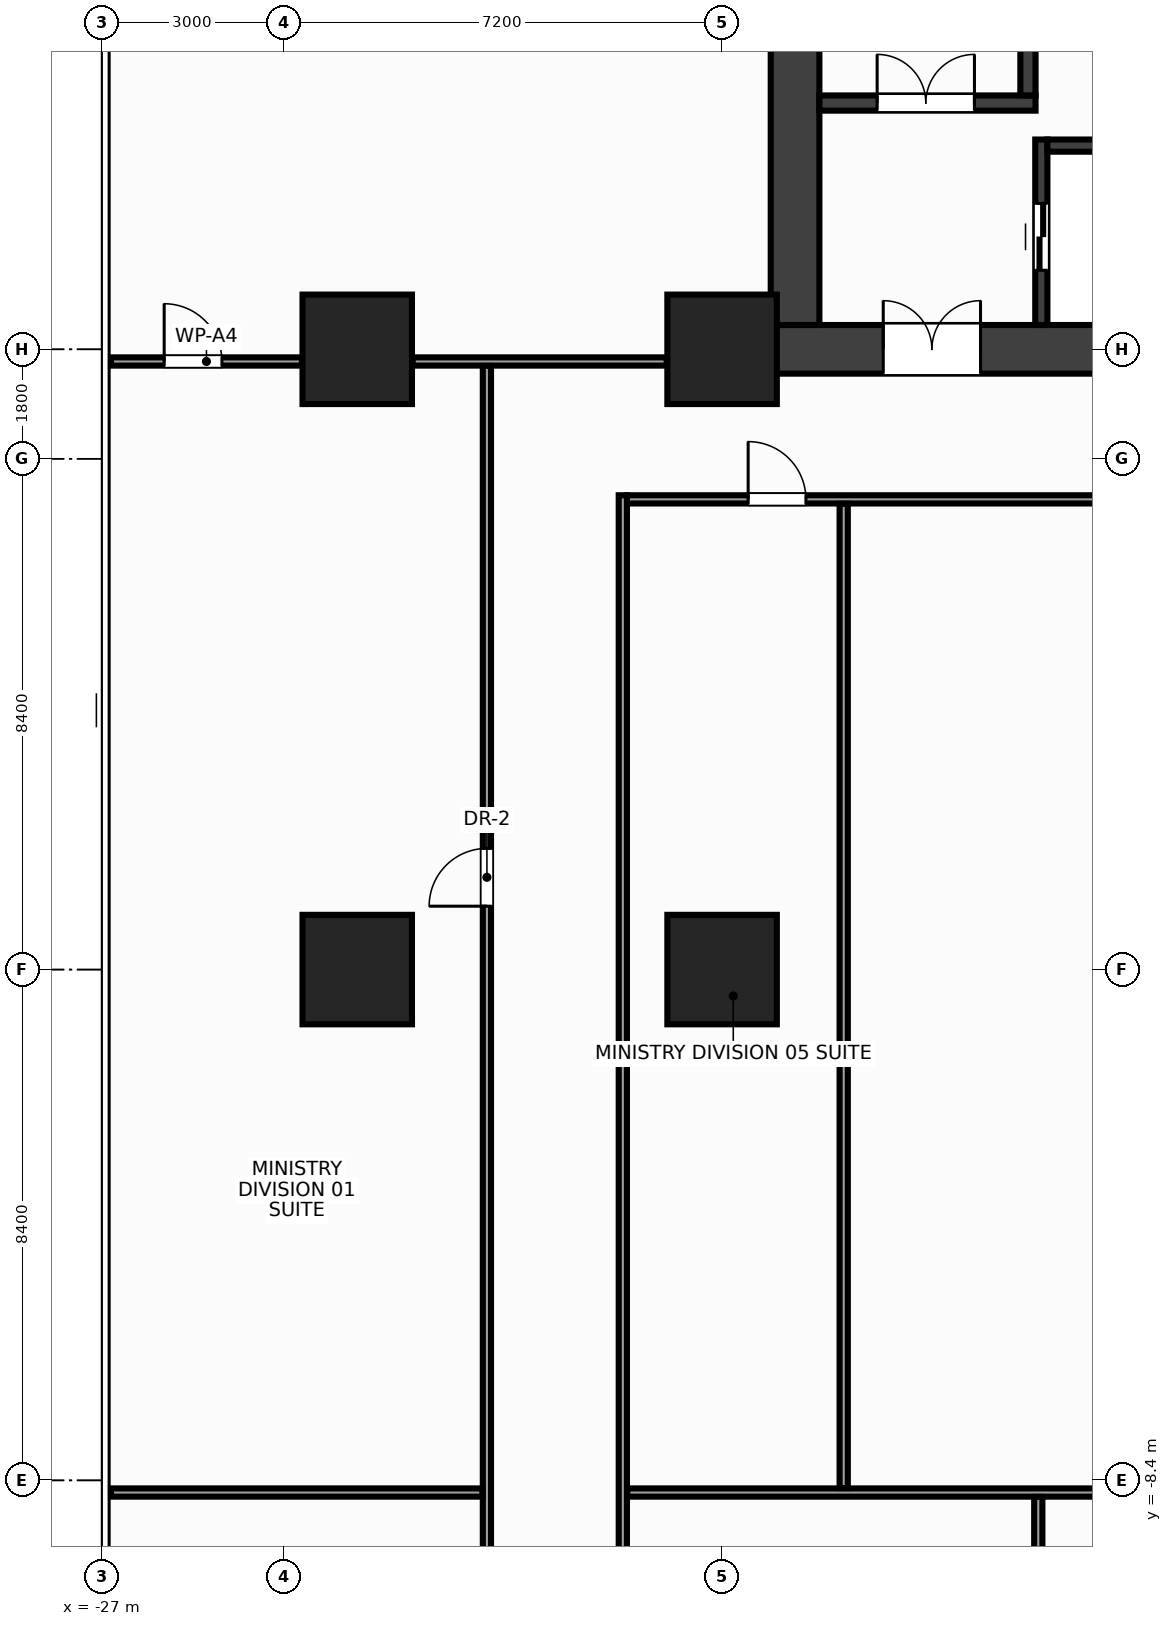
"""IFC4 building model, lengths in metres.
Left out: names, types, materials, properties, quantities, classifications, styles, units other than length and angle.
Written with IfcOpenShell. Run it as: python <this file> out.ifc"""

import sys

from ifc_helpers import new_model, si_unit, direction, frame, frame_2d, origin, origin_2d, place, context, subcontext, project, spatial, rectangle, extrude, source, transform, mapped, element, fill, save


model = new_model("IFC4")
c1 = context("Model", 3, precision=1e-05, world=origin(), true_north=direction((0.0, 1.0)))
c2 = subcontext(c1, "Body", "Model", "MODEL_VIEW")
j1 = project(units=[si_unit("LENGTHUNIT", "METRE"), si_unit("PLANEANGLEUNIT", "RADIAN")], contexts=[c1])
p1 = place(None, origin())
s1 = spatial("IfcSite", under=j1, at=p1, CompositionType="ELEMENT")
p2 = place(p1, origin())
s2 = spatial("IfcBuilding", under=s1, at=p2, CompositionType="ELEMENT")
p3 = place(p2, frame((0.0, 0.0, 34.4)))
s3 = spatial("IfcBuildingStorey", under=s2, at=p3, CompositionType="ELEMENT", Elevation=34.4)
m1 = source(origin(), c2, "Body", "SweptSolid", [
    extrude(rectangle(XDim=32.0, YDim=0.8, at=frame_2d((16.0, 0.0))), origin(), (0.0, 0.0, 1.0), 3.6),
])
p4 = place(p3, frame((-16.0, 10.2, 0.0), z_axis=(0.0, 0.0, 1.0), x_axis=(1.0, 0.0, 0.0)))
e1 = element("IfcWall", 1, at=p4, inside=s3, PredefinedType="SHEAR", context=c2, shape_type="MappedRepresentation", body=[
    mapped(m1, transform((0.0, 0.0, 0.0), x_axis=(1.0, 0.0, 0.0), y_axis=(0.0, 1.0, 0.0), z_axis=(0.0, 0.0, 1.0), scale=1.0)),
])
p5 = place(p4, frame((1.85, 0.0, 0.0)))
e2 = element("IfcOpeningElement", 2, at=p5, cuts=e1, PredefinedType="OPENING", context=c2, shape_type="SweptSolid", body=[
    extrude(rectangle(XDim=1.6, YDim=2.15, at=frame_2d((0.8, 1.075))), frame((0.0, 0.412, 0.0), z_axis=(0.0, -1.0, 0.0), x_axis=(1.0, 0.0, 0.0)), (0.0, 0.0, 1.0), 0.824),
])
p6 = place(p4, frame((28.55, 0.0, 0.0)))
e3 = element("IfcOpeningElement", 3, at=p6, cuts=e1, PredefinedType="OPENING", context=c2, shape_type="SweptSolid", body=[
    extrude(rectangle(XDim=1.6, YDim=2.15, at=frame_2d((0.8, 1.075))), frame((0.0, 0.412, 0.0), z_axis=(0.0, -1.0, 0.0), x_axis=(1.0, 0.0, 0.0)), (0.0, 0.0, 1.0), 0.824),
])
p7 = place(p4, frame((15.25, 0.0, 0.0)))
e4 = element("IfcOpeningElement", 4, at=p7, cuts=e1, PredefinedType="OPENING", context=c2, shape_type="SweptSolid", body=[
    extrude(rectangle(XDim=1.5, YDim=2.2, at=frame_2d((0.75, 1.1))), frame((0.0, 0.412, 0.0), z_axis=(0.0, -1.0, 0.0), x_axis=(1.0, 0.0, 0.0)), (0.0, 0.0, 1.0), 0.824),
])
m2 = source(origin(), c2, "Body", "SweptSolid", [
    extrude(rectangle(XDim=12.8, YDim=0.8, at=frame_2d((6.4, 0.0))), origin(), (0.0, 0.0, 1.0), 3.6),
])
p8 = place(p3, frame((-15.6, 10.6, 0.0), z_axis=(0.0, 0.0, 1.0), x_axis=(0.0, 1.0, 0.0)))
e5 = element("IfcWall", 5, at=p8, inside=s3, PredefinedType="SHEAR", context=c2, shape_type="MappedRepresentation", body=[
    mapped(m2, transform((0.0, 0.0, 0.0), x_axis=(1.0, 0.0, 0.0), y_axis=(0.0, 1.0, 0.0), z_axis=(0.0, 0.0, 1.0), scale=1.0)),
])
m3 = source(origin(), c2, "Body", "SweptSolid", [
    extrude(rectangle(XDim=3.555, YDim=0.25, at=frame_2d((1.777, 0.0))), origin(), (0.0, 0.0, 1.0), 3.6),
])
p9 = place(p3, frame((-15.2, 14.25, 0.0), z_axis=(0.0, 0.0, 1.0), x_axis=(1.0, 0.0, 0.0)))
e6 = element("IfcWall", 6, at=p9, inside=s3, PredefinedType="SHEAR", context=c2, shape_type="MappedRepresentation", body=[
    mapped(m3, transform((0.0, 0.0, 0.0), x_axis=(1.0, 0.0, 0.0), y_axis=(0.0, 1.0, 0.0), z_axis=(0.0, 0.0, 1.0), scale=1.0)),
])
p10 = place(p9, frame((0.95, 0.0, 0.0)))
e7 = element("IfcOpeningElement", 7, at=p10, cuts=e6, PredefinedType="OPENING", context=c2, shape_type="SweptSolid", body=[
    extrude(rectangle(XDim=1.6, YDim=2.15, at=frame_2d((0.8, 1.075))), frame((0.0, 0.137, 0.0), z_axis=(0.0, -1.0, 0.0), x_axis=(1.0, 0.0, 0.0)), (0.0, 0.0, 1.0), 0.274),
])
m4 = source(origin(), c2, "Body", "SweptSolid", [
    extrude(rectangle(XDim=9.025, YDim=0.25, at=frame_2d((4.512, 0.0))), origin(), (0.0, 0.0, 1.0), 3.6),
])
p11 = place(p3, frame((-11.77, 14.375, 0.0), z_axis=(0.0, 0.0, 1.0), x_axis=(0.0, 1.0, 0.0)))
e8 = element("IfcWall", 8, at=p11, inside=s3, PredefinedType="SHEAR", context=c2, shape_type="MappedRepresentation", body=[
    mapped(m4, transform((0.0, 0.0, 0.0), x_axis=(1.0, 0.0, 0.0), y_axis=(0.0, 1.0, 0.0), z_axis=(0.0, 0.0, 1.0), scale=1.0)),
])
m5 = source(origin(), c2, "Body", "SweptSolid", [
    extrude(rectangle(XDim=3.05, YDim=0.2, at=frame_2d((1.525, 0.0))), origin(), (0.0, 0.0, 1.0), 3.6),
])
p12 = place(p3, frame((-11.55, 10.6, 0.0), z_axis=(0.0, 0.0, 1.0), x_axis=(0.0, 1.0, 0.0)))
e9 = element("IfcWall", 9, at=p12, inside=s3, PredefinedType="SHEAR", context=c2, shape_type="MappedRepresentation", body=[
    mapped(m5, transform((0.0, 0.0, 0.0), x_axis=(1.0, 0.0, 0.0), y_axis=(0.0, 1.0, 0.0), z_axis=(0.0, 0.0, 1.0), scale=1.0)),
])
p13 = place(p12, frame((0.9, 0.0, 0.0)))
e10 = element("IfcOpeningElement", 10, at=p13, cuts=e9, PredefinedType="OPENING", context=c2, shape_type="SweptSolid", body=[
    extrude(rectangle(XDim=1.1, YDim=2.15, at=frame_2d((0.55, 1.075))), frame((0.0, 0.112, 0.0), z_axis=(0.0, -1.0, 0.0), x_axis=(1.0, 0.0, 0.0)), (0.0, 0.0, 1.0), 0.224),
])
m6 = source(origin(), c2, "Body", "SweptSolid", [
    extrude(rectangle(XDim=2.825, YDim=0.2, at=frame_2d((1.413, 0.0))), origin(), (0.0, 0.0, 1.0), 3.6),
])
p14 = place(p3, frame((-11.45, 13.55, 0.0), z_axis=(0.0, 0.0, 1.0), x_axis=(1.0, 0.0, 0.0)))
e11 = element("IfcWall", 11, at=p14, inside=s3, PredefinedType="SHEAR", context=c2, shape_type="MappedRepresentation", body=[
    mapped(m6, transform((0.0, 0.0, 0.0), x_axis=(1.0, 0.0, 0.0), y_axis=(0.0, 1.0, 0.0), z_axis=(0.0, 0.0, 1.0), scale=1.0)),
])
m7 = source(origin(), c2, "Body", "SweptSolid", [
    extrude(rectangle(XDim=1.8, YDim=1.8, at=origin_2d()), origin(), (0.0, 0.0, 1.0), 3.6),
])
for number, where, z_axis, x_axis in (
    (12, (-16.8, 0.0, 0.0), (0.0, 0.0, 1.0), (1.0, 0.0, 0.0)),
    (13, (-16.8, 10.2, 0.0), (0.0, 0.0, 1.0), (1.0, 0.0, 0.0)),
    (14, (-22.8, 0.0, 0.0), (0.0, 0.0, 1.0), (1.0, 0.0, 0.0)),
    (15, (-22.8, 10.2, 0.0), (0.0, 0.0, 1.0), (1.0, 0.0, 0.0)),
):
    element("IfcColumn", number, at=place(p3, frame(where, z_axis=z_axis, x_axis=x_axis)), inside=s3, PredefinedType="COLUMN", context=c2, shape_type="MappedRepresentation", body=[
        mapped(m7, transform((0.0, 0.0, 0.0), x_axis=(1.0, 0.0, 0.0), y_axis=(0.0, 1.0, 0.0), z_axis=(0.0, 0.0, 1.0), scale=1.0)),
    ])
m8 = source(origin(), c2, "Body", "SweptSolid", [
    extrude(rectangle(XDim=3.14, YDim=0.135, at=frame_2d((1.57, 0.0))), origin(), (0.0, 0.0, 1.0), 2.435),
])
p15 = place(p3, frame((-26.85, 10.0, 0.0), z_axis=(0.0, 0.0, 1.0), x_axis=(1.0, 0.0, 0.0)))
e16 = element("IfcWall", 16, at=p15, inside=s3, PredefinedType="PARTITIONING", context=c2, shape_type="MappedRepresentation", body=[
    mapped(m8, transform((0.0, 0.0, 0.0), x_axis=(1.0, 0.0, 0.0), y_axis=(0.0, 1.0, 0.0), z_axis=(0.0, 0.0, 1.0), scale=1.0)),
])
p16 = place(p15, frame((0.875, 0.0, 0.0)))
e17 = element("IfcOpeningElement", 17, at=p16, cuts=e16, PredefinedType="OPENING", context=c2, shape_type="SweptSolid", body=[
    extrude(rectangle(XDim=0.95, YDim=2.15, at=frame_2d((0.475, 1.075))), frame((0.0, 0.08, 0.0), z_axis=(0.0, -1.0, 0.0), x_axis=(1.0, 0.0, 0.0)), (0.0, 0.0, 1.0), 0.159),
])
m9 = source(origin(), c2, "Body", "SweptSolid", [
    extrude(rectangle(XDim=4.18, YDim=0.135, at=frame_2d((2.09, 0.0))), origin(), (0.0, 0.0, 1.0), 2.745),
])
p17 = place(p3, frame((-21.89, 10.0, 0.0), z_axis=(0.0, 0.0, 1.0), x_axis=(1.0, 0.0, 0.0)))
e18 = element("IfcWall", 18, at=p17, inside=s3, PredefinedType="PARTITIONING", context=c2, shape_type="MappedRepresentation", body=[
    mapped(m9, transform((0.0, 0.0, 0.0), x_axis=(1.0, 0.0, 0.0), y_axis=(0.0, 1.0, 0.0), z_axis=(0.0, 0.0, 1.0), scale=1.0)),
])
m10 = source(origin(), c2, "Body", "SweptSolid", [
    extrude(rectangle(XDim=36.73, YDim=0.135, at=frame_2d((18.365, 0.0))), origin(), (0.0, 0.0, 1.0), 2.745),
])
p18 = place(p3, frame((-18.365, 7.732, 0.0), z_axis=(0.0, 0.0, 1.0), x_axis=(1.0, 0.0, 0.0)))
e19 = element("IfcWall", 19, at=p18, inside=s3, PredefinedType="PARTITIONING", context=c2, shape_type="MappedRepresentation", body=[
    mapped(m10, transform((0.0, 0.0, 0.0), x_axis=(1.0, 0.0, 0.0), y_axis=(0.0, 1.0, 0.0), z_axis=(0.0, 0.0, 1.0), scale=1.0)),
])
p19 = place(p18, frame((10.49, 0.0, 0.0)))
e20 = element("IfcOpeningElement", 20, at=p19, cuts=e19, PredefinedType="OPENING", context=c2, shape_type="SweptSolid", body=[
    extrude(rectangle(XDim=0.95, YDim=2.15, at=frame_2d((0.475, 1.075))), frame((0.0, 0.08, 0.0), z_axis=(0.0, -1.0, 0.0), x_axis=(1.0, 0.0, 0.0)), (0.0, 0.0, 1.0), 0.159),
])
p20 = place(p18, frame((25.29, 0.0, 0.0)))
e21 = element("IfcOpeningElement", 21, at=p20, cuts=e19, PredefinedType="OPENING", context=c2, shape_type="SweptSolid", body=[
    extrude(rectangle(XDim=0.95, YDim=2.15, at=frame_2d((0.475, 1.075))), frame((0.0, 0.08, 0.0), z_axis=(0.0, -1.0, 0.0), x_axis=(1.0, 0.0, 0.0)), (0.0, 0.0, 1.0), 0.159),
])
p21 = place(p18, frame((1.994, 0.0, 0.0)))
e22 = element("IfcOpeningElement", 22, at=p21, cuts=e19, PredefinedType="OPENING", context=c2, shape_type="SweptSolid", body=[
    extrude(rectangle(XDim=0.95, YDim=2.15, at=frame_2d((0.475, 1.075))), frame((0.0, 0.08, 0.0), z_axis=(0.0, -1.0, 0.0), x_axis=(1.0, 0.0, 0.0)), (0.0, 0.0, 1.0), 0.159),
])
p22 = place(p18, frame((33.786, 0.0, 0.0)))
e23 = element("IfcOpeningElement", 23, at=p22, cuts=e19, PredefinedType="OPENING", context=c2, shape_type="SweptSolid", body=[
    extrude(rectangle(XDim=0.95, YDim=2.15, at=frame_2d((0.475, 1.075))), frame((0.0, 0.08, 0.0), z_axis=(0.0, -1.0, 0.0), x_axis=(1.0, 0.0, 0.0)), (0.0, 0.0, 1.0), 0.159),
])
m11 = source(origin(), c2, "Body", "SweptSolid", [
    extrude(rectangle(XDim=24.123, YDim=0.135, at=frame_2d((12.061, 0.0))), origin(), (0.0, 0.0, 1.0), 2.745),
])
p23 = place(p3, frame((-20.667, -14.195, 0.0), z_axis=(0.0, 0.0, 1.0), x_axis=(0.0, 1.0, 0.0)))
e24 = element("IfcWall", 24, at=p23, inside=s3, PredefinedType="PARTITIONING", context=c2, shape_type="MappedRepresentation", body=[
    mapped(m11, transform((0.0, 0.0, 0.0), x_axis=(1.0, 0.0, 0.0), y_axis=(0.0, 1.0, 0.0), z_axis=(0.0, 0.0, 1.0), scale=1.0)),
])
p24 = place(p23, frame((15.238, 0.0, 0.0)))
e25 = element("IfcOpeningElement", 25, at=p24, cuts=e24, PredefinedType="OPENING", context=c2, shape_type="SweptSolid", body=[
    extrude(rectangle(XDim=0.95, YDim=2.15, at=frame_2d((0.475, 1.075))), frame((0.0, 0.08, 0.0), z_axis=(0.0, -1.0, 0.0), x_axis=(1.0, 0.0, 0.0)), (0.0, 0.0, 1.0), 0.159),
])
p25 = place(p23, frame((1.249, 0.0, 0.0)))
e26 = element("IfcOpeningElement", 26, at=p25, cuts=e24, PredefinedType="OPENING", context=c2, shape_type="SweptSolid", body=[
    extrude(rectangle(XDim=0.95, YDim=2.15, at=frame_2d((0.475, 1.075))), frame((0.0, 0.08, 0.0), z_axis=(0.0, -1.0, 0.0), x_axis=(1.0, 0.0, 0.0)), (0.0, 0.0, 1.0), 0.159),
])
m12 = source(origin(), c2, "Body", "SweptSolid", [
    extrude(rectangle(XDim=21.995, YDim=0.135, at=frame_2d((10.998, 0.0))), origin(), (0.0, 0.0, 1.0), 2.745),
])
p26 = place(p3, frame((-18.433, -14.195, 0.0), z_axis=(0.0, 0.0, 1.0), x_axis=(0.0, 1.0, 0.0)))
e27 = element("IfcWall", 27, at=p26, inside=s3, PredefinedType="PARTITIONING", context=c2, shape_type="MappedRepresentation", body=[
    mapped(m12, transform((0.0, 0.0, 0.0), x_axis=(1.0, 0.0, 0.0), y_axis=(0.0, 1.0, 0.0), z_axis=(0.0, 0.0, 1.0), scale=1.0)),
])
p27 = place(p26, frame((0.809, 0.0, 0.0)))
e28 = element("IfcOpeningElement", 28, at=p27, cuts=e27, PredefinedType="OPENING", context=c2, shape_type="SweptSolid", body=[
    extrude(rectangle(XDim=0.95, YDim=2.15, at=frame_2d((0.475, 1.075))), frame((0.0, 0.08, 0.0), z_axis=(0.0, -1.0, 0.0), x_axis=(1.0, 0.0, 0.0)), (0.0, 0.0, 1.0), 0.159),
])
m13 = source(origin(), c2, "Body", "SweptSolid", [
    extrude(rectangle(XDim=6.11, YDim=0.135, at=frame_2d((3.055, 0.0))), origin(), (0.0, 0.0, 1.0), 2.745),
])
p28 = place(p3, frame((-26.85, -8.6, 0.0), z_axis=(0.0, 0.0, 1.0), x_axis=(1.0, 0.0, 0.0)))
e29 = element("IfcWall", 29, at=p28, inside=s3, PredefinedType="PARTITIONING", context=c2, shape_type="MappedRepresentation", body=[
    mapped(m13, transform((0.0, 0.0, 0.0), x_axis=(1.0, 0.0, 0.0), y_axis=(0.0, 1.0, 0.0), z_axis=(0.0, 0.0, 1.0), scale=1.0)),
])
m14 = source(origin(), c2, "Body", "SweptSolid", [
    extrude(rectangle(XDim=36.72, YDim=0.135, at=frame_2d((18.36, 0.0))), origin(), (0.0, 0.0, 1.0), 2.745),
])
p29 = place(p3, frame((-18.36, -8.6, 0.0), z_axis=(0.0, 0.0, 1.0), x_axis=(1.0, 0.0, 0.0)))
e30 = element("IfcWall", 30, at=p29, inside=s3, PredefinedType="PARTITIONING", context=c2, shape_type="MappedRepresentation", body=[
    mapped(m14, transform((0.0, 0.0, 0.0), x_axis=(1.0, 0.0, 0.0), y_axis=(0.0, 1.0, 0.0), z_axis=(0.0, 0.0, 1.0), scale=1.0)),
])
p30 = place(p29, frame((10.485, 0.0, 0.0)))
e31 = element("IfcOpeningElement", 31, at=p30, cuts=e30, PredefinedType="OPENING", context=c2, shape_type="SweptSolid", body=[
    extrude(rectangle(XDim=0.95, YDim=2.15, at=frame_2d((0.475, 1.075))), frame((0.0, 0.08, 0.0), z_axis=(0.0, -1.0, 0.0), x_axis=(1.0, 0.0, 0.0)), (0.0, 0.0, 1.0), 0.159),
])
p31 = place(p29, frame((16.285, 0.0, 0.0)))
e32 = element("IfcOpeningElement", 32, at=p31, cuts=e30, PredefinedType="OPENING", context=c2, shape_type="SweptSolid", body=[
    extrude(rectangle(XDim=0.95, YDim=2.15, at=frame_2d((0.475, 1.075))), frame((0.0, 0.08, 0.0), z_axis=(0.0, -1.0, 0.0), x_axis=(1.0, 0.0, 0.0)), (0.0, 0.0, 1.0), 0.159),
])
p32 = place(p29, frame((27.685, 0.0, 0.0)))
e33 = element("IfcOpeningElement", 33, at=p32, cuts=e30, PredefinedType="OPENING", context=c2, shape_type="SweptSolid", body=[
    extrude(rectangle(XDim=0.95, YDim=2.15, at=frame_2d((0.475, 1.075))), frame((0.0, 0.08, 0.0), z_axis=(0.0, -1.0, 0.0), x_axis=(1.0, 0.0, 0.0)), (0.0, 0.0, 1.0), 0.159),
])
m15 = source(origin(), c2, "Body", "SweptSolid", [
    extrude(rectangle(XDim=16.188, YDim=0.135, at=frame_2d((8.094, 0.0))), origin(), (0.0, 0.0, 1.0), 2.37),
])
p33 = place(p3, frame((-14.8, -8.528, 0.0), z_axis=(0.0, 0.0, 1.0), x_axis=(0.0, 1.0, 0.0)))
e34 = element("IfcWall", 34, at=p33, inside=s3, PredefinedType="PARTITIONING", context=c2, shape_type="MappedRepresentation", body=[
    mapped(m15, transform((0.0, 0.0, 0.0), x_axis=(1.0, 0.0, 0.0), y_axis=(0.0, 1.0, 0.0), z_axis=(0.0, 0.0, 1.0), scale=1.0)),
])
m16 = source(origin(), c2, "Body", "SweptSolid", [
    extrude(rectangle(XDim=18.177, YDim=0.135, at=frame_2d((9.089, 0.0))), origin(), (0.0, 0.0, 1.0), 2.745),
])
p34 = place(p3, frame((-11.6, -26.85, 0.0), z_axis=(0.0, 0.0, 1.0), x_axis=(0.0, 1.0, 0.0)))
e35 = element("IfcWall", 35, at=p34, inside=s3, PredefinedType="PARTITIONING", context=c2, shape_type="MappedRepresentation", body=[
    mapped(m16, transform((0.0, 0.0, 0.0), x_axis=(1.0, 0.0, 0.0), y_axis=(0.0, 1.0, 0.0), z_axis=(0.0, 0.0, 1.0), scale=1.0)),
])
m17 = source(origin(), c2, "Body", "SweptSolid", [
    extrude(rectangle(XDim=1.6, YDim=2.15, at=frame_2d((0.8, 1.075))), frame((0.0, 0.025, 0.0), z_axis=(0.0, -1.0, 0.0), x_axis=(1.0, 0.0, 0.0)), (0.0, 0.0, 1.0), 0.05),
])
p35 = place(p10, origin())
e36 = element("IfcDoor", 36, at=p35, inside=s3, OperationType="DOUBLE_DOOR_SINGLE_SWING", PredefinedType="DOOR", context=c2, shape_type="MappedRepresentation", body=[
    mapped(m17, transform((0.0, 0.0, 0.0), x_axis=(1.0, 0.0, 0.0), y_axis=(0.0, 1.0, 0.0), z_axis=(0.0, 0.0, 1.0), scale=1.0)),
])
fill(e7, e36)
p36 = place(p5, origin())
e37 = element("IfcDoor", 37, at=p36, inside=s3, OperationType="DOUBLE_DOOR_SINGLE_SWING", PredefinedType="DOOR", context=c2, shape_type="MappedRepresentation", body=[
    mapped(m17, transform((0.0, 0.0, 0.0), x_axis=(1.0, 0.0, 0.0), y_axis=(0.0, 1.0, 0.0), z_axis=(0.0, 0.0, 1.0), scale=1.0)),
])
fill(e2, e37)
m18 = source(origin(), c2, "Body", "SweptSolid", [
    extrude(rectangle(XDim=1.1, YDim=2.15, at=frame_2d((0.55, 1.075))), frame((0.0, 0.025, 0.0), z_axis=(0.0, -1.0, 0.0), x_axis=(1.0, 0.0, 0.0)), (0.0, 0.0, 1.0), 0.05),
])
p37 = place(p13, origin())
e38 = element("IfcDoor", 38, at=p37, inside=s3, OperationType="DOUBLE_DOOR_SLIDING", PredefinedType="DOOR", context=c2, shape_type="MappedRepresentation", body=[
    mapped(m18, transform((0.0, 0.0, 0.0), x_axis=(1.0, 0.0, 0.0), y_axis=(0.0, 1.0, 0.0), z_axis=(0.0, 0.0, 1.0), scale=1.0)),
])
fill(e10, e38)
m19 = source(origin(), c2, "Body", "SweptSolid", [
    extrude(rectangle(XDim=0.95, YDim=2.15, at=frame_2d((0.475, 1.075))), frame((0.0, 0.025, 0.0), z_axis=(0.0, -1.0, 0.0), x_axis=(1.0, 0.0, 0.0)), (0.0, 0.0, 1.0), 0.05),
])
p38 = place(p24, origin())
e39 = element("IfcDoor", 39, at=p38, inside=s3, OperationType="SINGLE_SWING_LEFT", PredefinedType="DOOR", context=c2, shape_type="MappedRepresentation", body=[
    mapped(m19, transform((0.0, 0.0, 0.0), x_axis=(1.0, 0.0, 0.0), y_axis=(0.0, 1.0, 0.0), z_axis=(0.0, 0.0, 1.0), scale=1.0)),
])
fill(e25, e39)
p39 = place(p21, origin())
e40 = element("IfcDoor", 40, at=p39, inside=s3, OperationType="SINGLE_SWING_LEFT", PredefinedType="DOOR", context=c2, shape_type="MappedRepresentation", body=[
    mapped(m19, transform((0.0, 0.0, 0.0), x_axis=(1.0, 0.0, 0.0), y_axis=(0.0, 1.0, 0.0), z_axis=(0.0, 0.0, 1.0), scale=1.0)),
])
fill(e22, e40)
p40 = place(p16, origin())
e41 = element("IfcDoor", 41, at=p40, inside=s3, OperationType="SINGLE_SWING_LEFT", PredefinedType="DOOR", context=c2, shape_type="MappedRepresentation", body=[
    mapped(m19, transform((0.0, 0.0, 0.0), x_axis=(1.0, 0.0, 0.0), y_axis=(0.0, 1.0, 0.0), z_axis=(0.0, 0.0, 1.0), scale=1.0)),
])
fill(e17, e41)
save(model, sys.argv[1])
